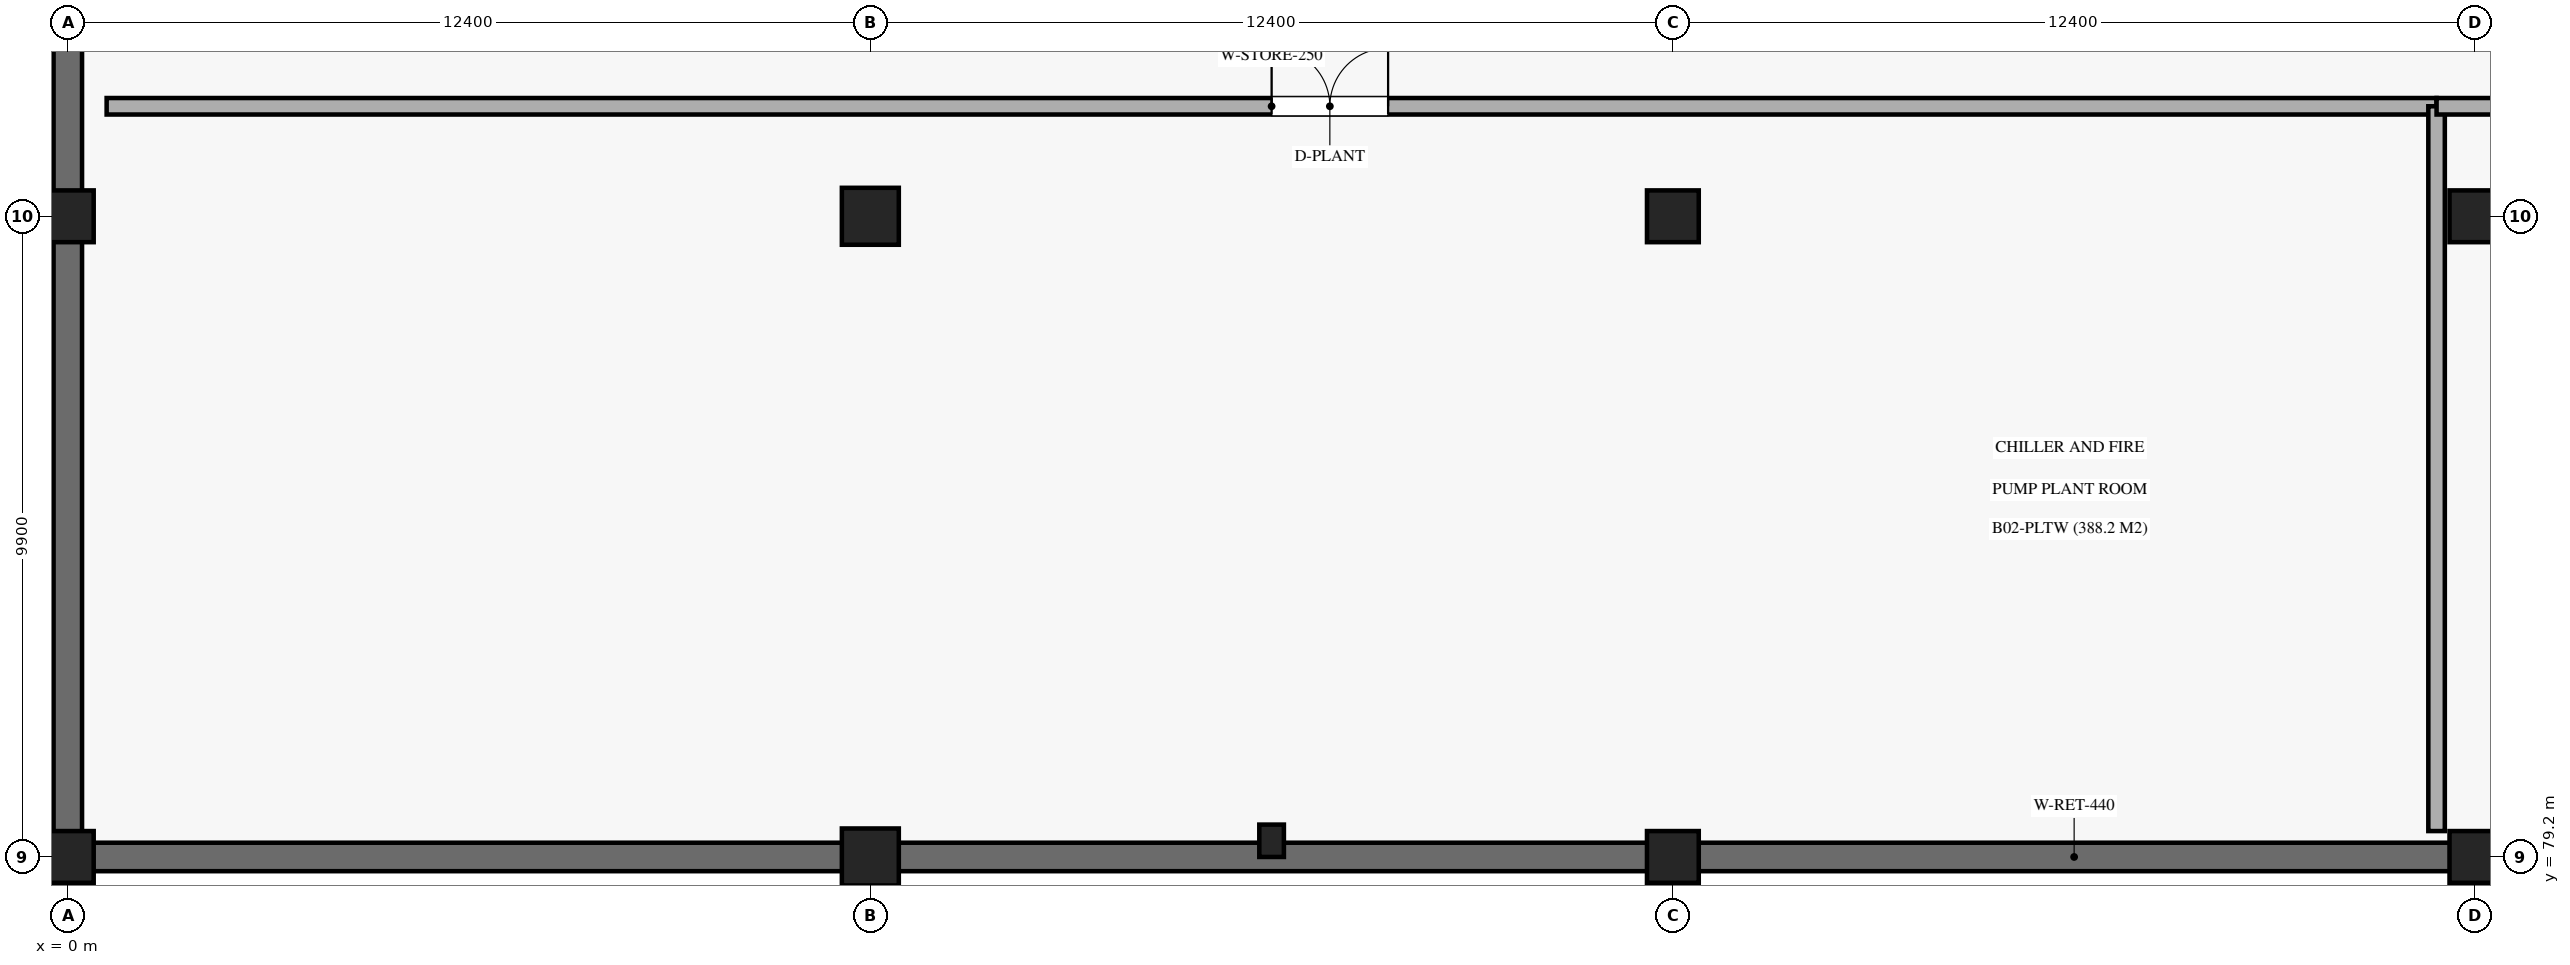
"""IFC4 building model, lengths in metres.
Left out: names, types, materials, properties, quantities, classifications, styles, units other than length and angle.
Written with IfcOpenShell. Run it as: python <this file> out.ifc"""

import sys

from ifc_helpers import new_model, si_unit, direction, frame, frame_2d, origin, origin_2d, place, context, subcontext, project, spatial, rectangle, circle, extrude, element, fill, save


model = new_model("IFC4")
c1 = context("Model", 3, precision=1e-05, world=origin(), true_north=direction((0.0, 1.0)))
c2 = subcontext(c1, "Body", "Model", "MODEL_VIEW")
j1 = project(units=[si_unit("LENGTHUNIT", "METRE"), si_unit("PLANEANGLEUNIT", "RADIAN")], contexts=[c1])
p1 = place(None, origin())
s1 = spatial("IfcSite", under=j1, at=p1, CompositionType="ELEMENT")
p2 = place(p1, origin())
s2 = spatial("IfcBuilding", under=s1, at=p2, CompositionType="ELEMENT")
p3 = place(p2, frame((0.0, 0.0, -9.18)))
s3 = spatial("IfcBuildingStorey", under=s2, at=p3, CompositionType="ELEMENT", Elevation=-9.18)
for number, where, z_axis, x_axis in (
    (1, (0.0, 79.2, 0.0), (0.0, 0.0, 1.0), (1.0, 0.0, 0.0)),
    (2, (0.0, 89.1, 0.0), (0.0, 0.0, 1.0), (1.0, 0.0, 0.0)),
):
    element("IfcColumn", number, at=place(p3, frame(where, z_axis=z_axis, x_axis=x_axis)), inside=s3, PredefinedType="COLUMN", context=c2, shape_type="SweptSolid", body=[
        extrude(rectangle(XDim=0.8, YDim=0.8, at=origin_2d()), origin(), (0.0, 0.0, 1.0), 4.59),
    ])
for number, where, z_axis, x_axis in (
    (3, (12.4, 79.2, 0.0), (0.0, 0.0, 1.0), (1.0, 0.0, 0.0)),
    (4, (12.4, 89.1, 0.0), (0.0, 0.0, 1.0), (1.0, 0.0, 0.0)),
):
    element("IfcColumn", number, at=place(p3, frame(where, z_axis=z_axis, x_axis=x_axis)), inside=s3, PredefinedType="COLUMN", context=c2, shape_type="SweptSolid", body=[
        extrude(circle(Radius=0.44, at=origin_2d()), origin(), (0.0, 0.0, 1.0), 4.59),
    ])
for number, where, z_axis, x_axis in (
    (5, (24.8, 79.2, 0.0), (0.0, 0.0, 1.0), (1.0, 0.0, 0.0)),
    (6, (24.8, 89.1, 0.0), (0.0, 0.0, 1.0), (1.0, 0.0, 0.0)),
    (7, (37.2, 79.2, 0.0), (0.0, 0.0, 1.0), (1.0, 0.0, 0.0)),
    (8, (37.2, 89.1, 0.0), (0.0, 0.0, 1.0), (1.0, 0.0, 0.0)),
):
    element("IfcColumn", number, at=place(p3, frame(where, z_axis=z_axis, x_axis=x_axis)), inside=s3, PredefinedType="COLUMN", context=c2, shape_type="SweptSolid", body=[
        extrude(rectangle(XDim=0.8, YDim=0.8, at=origin_2d()), origin(), (0.0, 0.0, 1.0), 4.59),
    ])
p4 = place(p3, frame((18.6, 79.45, 0.0), z_axis=(0.0, 0.0, 1.0), x_axis=(1.0, 0.0, 0.0)))
e9 = element("IfcColumn", 9, at=p4, inside=s3, PredefinedType="PILASTER", context=c2, shape_type="SweptSolid", body=[
    extrude(rectangle(XDim=0.38, YDim=0.5, at=origin_2d()), origin(), (0.0, 0.0, 1.0), 4.59),
])
p5 = place(p3, frame((0.0, 118.8, 0.0), z_axis=(0.0, 0.0, 1.0), x_axis=(0.0, -1.0, 0.0)))
e10 = element("IfcWall", 10, at=p5, inside=s3, PredefinedType="USERDEFINED", context=c2, shape_type="SweptSolid", body=[
    extrude(rectangle(XDim=39.6, YDim=0.44, at=frame_2d((19.8, 0.0))), origin(), (0.0, 0.0, 1.0), 3.66),
])
p6 = place(p3, frame((0.0, 79.2, 0.0), z_axis=(0.0, 0.0, 1.0), x_axis=(1.0, 0.0, 0.0)))
e11 = element("IfcWall", 11, at=p6, inside=s3, PredefinedType="USERDEFINED", context=c2, shape_type="SweptSolid", body=[
    extrude(rectangle(XDim=62.0, YDim=0.44, at=frame_2d((31.0, 0.0))), origin(), (0.0, 0.0, 1.0), 3.66),
])
p7 = place(p3, frame((0.6, 90.8, 0.0), z_axis=(0.0, 0.0, 1.0), x_axis=(1.0, 0.0, 0.0)))
e12 = element("IfcWall", 12, at=p7, inside=s3, PredefinedType="SOLIDWALL", context=c2, shape_type="SweptSolid", body=[
    extrude(rectangle(XDim=36.0, YDim=0.255, at=frame_2d((18.0, 0.0))), origin(), (0.0, 0.0, 1.0), 3.43),
])
p8 = place(p7, frame((18.0, 0.0, 0.0)))
e13 = element("IfcOpeningElement", 13, at=p8, cuts=e12, PredefinedType="OPENING", context=c2, shape_type="SweptSolid", body=[
    extrude(rectangle(XDim=1.8, YDim=2.25, at=frame_2d((0.9, 1.125))), frame((0.0, 0.137, 0.0), z_axis=(0.0, -1.0, 0.0), x_axis=(1.0, 0.0, 0.0)), (0.0, 0.0, 1.0), 0.275),
])
p9 = place(p3, frame((36.6, 79.6, 0.0), z_axis=(0.0, 0.0, 1.0), x_axis=(0.0, 1.0, 0.0)))
e14 = element("IfcWall", 14, at=p9, inside=s3, PredefinedType="SOLIDWALL", context=c2, shape_type="SweptSolid", body=[
    extrude(rectangle(XDim=11.2, YDim=0.255, at=frame_2d((5.6, 0.0))), origin(), (0.0, 0.0, 1.0), 3.43),
])
p10 = place(p3, frame((36.6, 90.8, 0.0), z_axis=(0.0, 0.0, 1.0), x_axis=(1.0, 0.0, 0.0)))
e15 = element("IfcWall", 15, at=p10, inside=s3, PredefinedType="SOLIDWALL", context=c2, shape_type="SweptSolid", body=[
    extrude(rectangle(XDim=25.0, YDim=0.255, at=frame_2d((12.5, 0.0))), origin(), (0.0, 0.0, 1.0), 3.43),
])
p11 = place(p10, frame((7.5, 0.0, 0.0)))
e16 = element("IfcOpeningElement", 16, at=p11, cuts=e15, PredefinedType="OPENING", context=c2, shape_type="SweptSolid", body=[
    extrude(rectangle(XDim=2.0, YDim=2.4, at=frame_2d((1.0, 1.2))), frame((0.0, 0.137, 0.0), z_axis=(0.0, -1.0, 0.0), x_axis=(1.0, 0.0, 0.0)), (0.0, 0.0, 1.0), 0.275),
])
p12 = place(p8, origin())
e17 = element("IfcDoor", 17, at=p12, inside=s3, OperationType="DOUBLE_DOOR_SINGLE_SWING", PredefinedType="DOOR", context=c2, shape_type="SweptSolid", body=[
    extrude(rectangle(XDim=1.8, YDim=2.25, at=frame_2d((0.9, 1.125))), frame((0.0, 0.025, 0.0), z_axis=(0.0, -1.0, 0.0), x_axis=(1.0, 0.0, 0.0)), (0.0, 0.0, 1.0), 0.05),
])
fill(e13, e17)
save(model, sys.argv[1])
